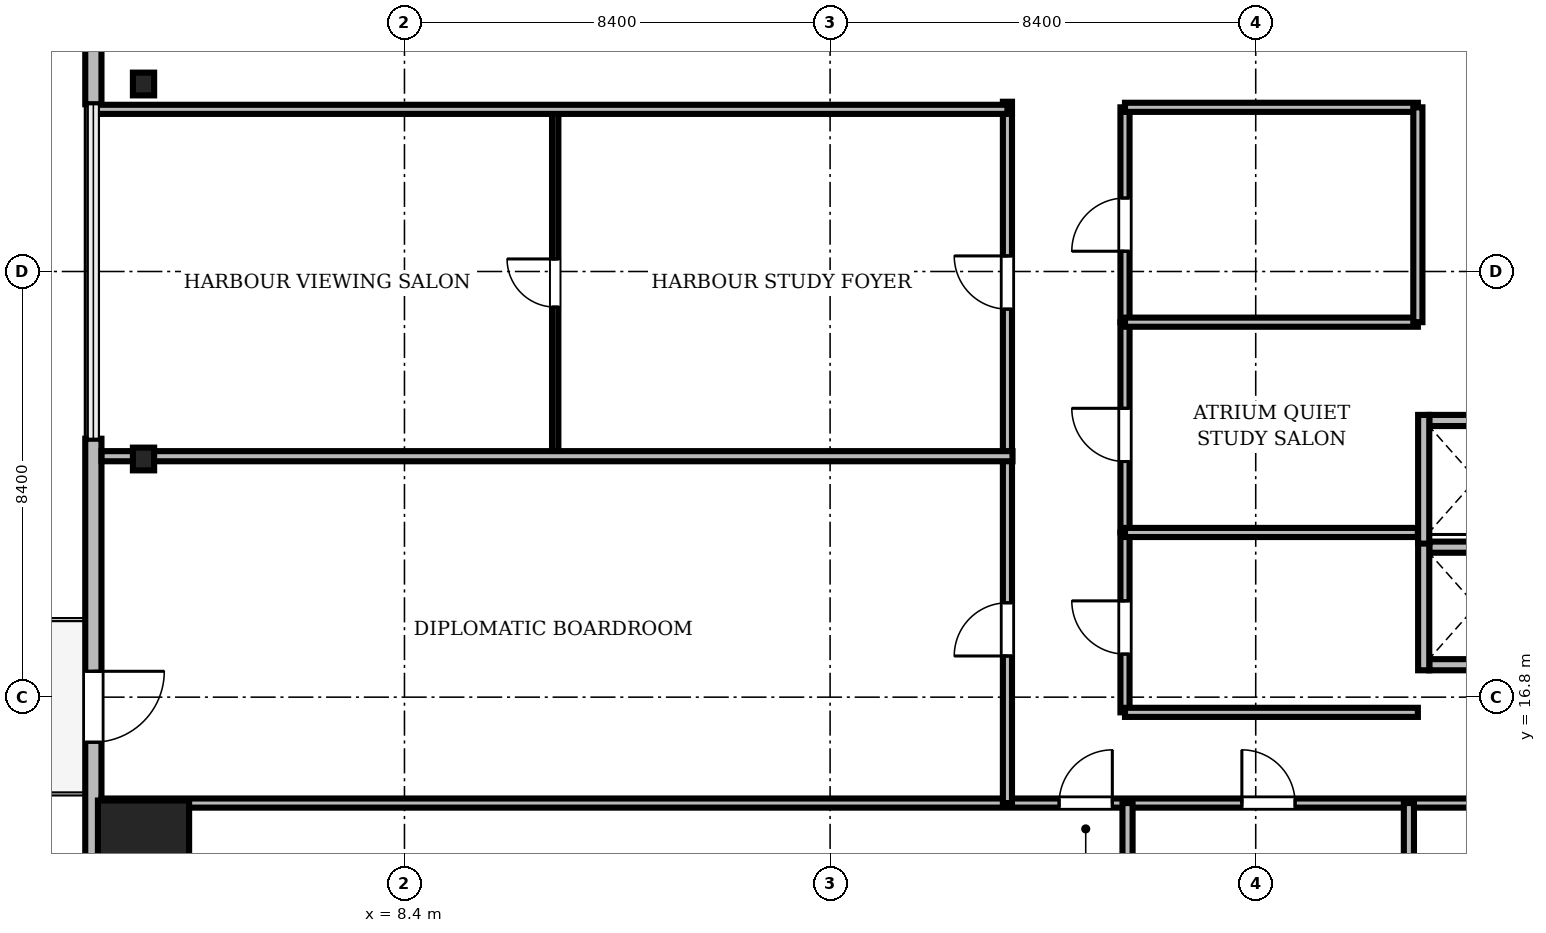
"""IFC4 building model, lengths in metres.
Left out: names, types, materials, properties, quantities, classifications, styles, units other than length and angle.
Written with IfcOpenShell. Run it as: python <this file> out.ifc"""

import sys

from ifc_helpers import new_model, si_unit, direction, frame, frame_2d, origin, origin_2d, place, context, subcontext, project, spatial, rectangle, i_section, extrude, source, transform, mapped, element, fill, save


model = new_model("IFC4")
c1 = context("Model", 3, precision=1e-05, world=origin(), true_north=direction((0.0, 1.0)))
c2 = subcontext(c1, "Body", "Model", "MODEL_VIEW")
j1 = project(units=[si_unit("LENGTHUNIT", "METRE"), si_unit("PLANEANGLEUNIT", "RADIAN")], contexts=[c1])
p1 = place(None, origin())
s1 = spatial("IfcSite", under=j1, at=p1, CompositionType="ELEMENT")
p2 = place(p1, origin())
s2 = spatial("IfcBuilding", under=s1, at=p2, CompositionType="ELEMENT")
p3 = place(p2, frame((0.0, 0.0, 67.75)))
s3 = spatial("IfcBuildingStorey", under=s2, at=p3, CompositionType="ELEMENT", Elevation=67.75)
m1 = source(origin(), c2, "Body", "SweptSolid", [
    extrude(rectangle(XDim=1.8, YDim=1.8, at=origin_2d()), origin(), (0.0, 0.0, 1.0), 3.41),
])
p4 = place(p3, frame((3.25, 13.86, 0.0), z_axis=(0.0, 0.0, 1.0), x_axis=(1.0, 0.0, 0.0)))
e1 = element("IfcColumn", 1, at=p4, inside=s3, PredefinedType="COLUMN", context=c2, shape_type="MappedRepresentation", body=[
    mapped(m1, transform((0.0, 0.0, 0.0), scale=1.0)),
])
m2 = source(origin(), c2, "Body", "SweptSolid", [
    extrude(i_section(OverallWidth=0.419, OverallDepth=0.449, WebThickness=0.031, FlangeThickness=0.048, FilletRadius=0.015, at=origin_2d()), origin(), (0.0, 0.0, 1.0), 3.41),
])
for number, where, z_axis, x_axis in (
    (2, (3.25, 28.9, 0.0), (0.0, 0.0, 1.0), (1.0, 0.0, 0.0)),
    (3, (3.25, 21.5, 0.0), (0.0, 0.0, 1.0), (1.0, 0.0, 0.0)),
):
    element("IfcColumn", number, at=place(p3, frame(where, z_axis=z_axis, x_axis=x_axis)), inside=s3, PredefinedType="COLUMN", context=c2, shape_type="MappedRepresentation", body=[
        mapped(m2, transform((0.0, 0.0, 0.0), scale=1.0)),
    ])
m3 = source(origin(), c2, "Body", "SweptSolid", [
    extrude(rectangle(XDim=15.6, YDim=0.32, at=frame_2d((7.8, 0.0))), origin(), (0.0, 0.0, 1.0), 3.41),
])
p5 = place(p3, frame((2.26, 44.1, 0.0), z_axis=(0.0, 0.0, 1.0), x_axis=(0.0, -1.0, 0.0)))
e4 = element("IfcWall", 4, at=p5, inside=s3, PredefinedType="SOLIDWALL", context=c2, shape_type="MappedRepresentation", body=[
    mapped(m3, transform((0.0, 0.0, 0.0), scale=1.0)),
])
m4 = source(origin(), c2, "Body", "SweptSolid", [
    extrude(rectangle(XDim=2.2, YDim=2.4, at=frame_2d((1.1, 1.2))), frame((0.0, 0.17, 0.0), z_axis=(0.0, -1.0, 0.0), x_axis=(1.0, 0.0, 0.0)), (0.0, 0.0, 1.0), 0.34),
])
p6 = place(p5, frame((3.005, 0.0, 0.72)))
e5 = element("IfcOpeningElement", 5, at=p6, cuts=e4, PredefinedType="OPENING", context=c2, shape_type="MappedRepresentation", body=[
    mapped(m4, transform((0.0, 0.0, 0.0), scale=1.0)),
])
m5 = source(origin(), c2, "Body", "SweptSolid", [
    extrude(rectangle(XDim=15.6, YDim=0.32, at=frame_2d((7.8, 0.0))), origin(), (0.0, 0.0, 1.0), 3.41),
])
p7 = place(p3, frame((2.26, 21.9, 0.0), z_axis=(0.0, 0.0, 1.0), x_axis=(0.0, -1.0, 0.0)))
e6 = element("IfcWall", 6, at=p7, inside=s3, PredefinedType="SOLIDWALL", context=c2, shape_type="MappedRepresentation", body=[
    mapped(m5, transform((0.0, 0.0, 0.0), scale=1.0)),
])
m6 = source(origin(), c2, "Body", "SweptSolid", [
    extrude(rectangle(XDim=1.4, YDim=2.3, at=frame_2d((0.7, 1.15))), frame((0.0, 0.17, 0.0), z_axis=(0.0, -1.0, 0.0), x_axis=(1.0, 0.0, 0.0)), (0.0, 0.0, 1.0), 0.34),
])
p8 = place(p7, frame((4.59, 0.0, 0.0)))
e7 = element("IfcOpeningElement", 7, at=p8, cuts=e6, PredefinedType="OPENING", context=c2, shape_type="MappedRepresentation", body=[
    mapped(m6, transform((0.0, 0.0, 0.0), scale=1.0)),
])
p9 = place(p7, frame((10.395, 0.0, 0.72)))
e8 = element("IfcOpeningElement", 8, at=p9, cuts=e6, PredefinedType="OPENING", context=c2, shape_type="MappedRepresentation", body=[
    mapped(m4, transform((0.0, 0.0, 0.0), scale=1.0)),
])
m7 = source(origin(), c2, "Body", "SweptSolid", [
    extrude(rectangle(XDim=1.85, YDim=0.22, at=frame_2d((0.925, 0.0))), origin(), (0.0, 0.0, 1.0), 3.41),
])
for number, where, z_axis, x_axis in (
    (9, (28.625, 17.44, 0.0), (0.0, 0.0, 1.0), (1.0, 0.0, 0.0)),
    (10, (28.625, 19.76, 0.0), (0.0, 0.0, 1.0), (1.0, 0.0, 0.0)),
):
    element("IfcWall", number, at=place(p3, frame(where, z_axis=z_axis, x_axis=x_axis)), inside=s3, PredefinedType="SOLIDWALL", context=c2, shape_type="MappedRepresentation", body=[
        mapped(m7, transform((0.0, 0.0, 0.0), scale=1.0)),
    ])
m8 = source(origin(), c2, "Body", "SweptSolid", [
    extrude(rectangle(XDim=2.54, YDim=0.22, at=frame_2d((1.27, 0.0))), origin(), (0.0, 0.0, 1.0), 3.41),
])
p10 = place(p3, frame((28.515, 17.33, 0.0), z_axis=(0.0, 0.0, 1.0), x_axis=(0.0, 1.0, 0.0)))
e11 = element("IfcWall", 11, at=p10, inside=s3, PredefinedType="SOLIDWALL", context=c2, shape_type="MappedRepresentation", body=[
    mapped(m8, transform((0.0, 0.0, 0.0), scale=1.0)),
])
p11 = place(p3, frame((28.625, 22.26, 0.0), z_axis=(0.0, 0.0, 1.0), x_axis=(1.0, 0.0, 0.0)))
e12 = element("IfcWall", 12, at=p11, inside=s3, PredefinedType="SOLIDWALL", context=c2, shape_type="MappedRepresentation", body=[
    mapped(m7, transform((0.0, 0.0, 0.0), scale=1.0)),
])
p12 = place(p3, frame((28.515, 19.83, 0.0), z_axis=(0.0, 0.0, 1.0), x_axis=(0.0, 1.0, 0.0)))
e13 = element("IfcWall", 13, at=p12, inside=s3, PredefinedType="SOLIDWALL", context=c2, shape_type="MappedRepresentation", body=[
    mapped(m8, transform((0.0, 0.0, 0.0), scale=1.0)),
])
m9 = source(origin(), c2, "Body", "SweptSolid", [
    extrude(rectangle(XDim=46.156, YDim=0.18, at=frame_2d((23.078, 0.0))), origin(), (0.0, 0.0, 1.0), 2.652),
])
p13 = place(p3, frame((2.422, 14.71, 0.0), z_axis=(0.0, 0.0, 1.0), x_axis=(1.0, 0.0, 0.0)))
e14 = element("IfcWall", 14, at=p13, inside=s3, PredefinedType="PARTITIONING", context=c2, shape_type="MappedRepresentation", body=[
    mapped(m9, transform((0.0, 0.0, 0.0), scale=1.0)),
])
m10 = source(origin(), c2, "Body", "SweptSolid", [
    extrude(rectangle(XDim=1.05, YDim=2.2, at=frame_2d((0.525, 1.1))), frame((0.0, 0.1, 0.0), z_axis=(0.0, -1.0, 0.0), x_axis=(1.0, 0.0, 0.0)), (0.0, 0.0, 1.0), 0.2),
])
p14 = place(p13, frame((18.898, 0.0, 0.0)))
e15 = element("IfcOpeningElement", 15, at=p14, cuts=e14, PredefinedType="OPENING", context=c2, shape_type="MappedRepresentation", body=[
    mapped(m10, transform((0.0, 0.0, 0.0), scale=1.0)),
])
p15 = place(p13, frame((22.505, 0.0, 0.0)))
e16 = element("IfcOpeningElement", 16, at=p15, cuts=e14, PredefinedType="OPENING", context=c2, shape_type="MappedRepresentation", body=[
    mapped(m10, transform((0.0, 0.0, 0.0), scale=1.0)),
])
p16 = place(p13, frame((28.814, 0.0, 0.0)))
e17 = element("IfcOpeningElement", 17, at=p16, cuts=e14, PredefinedType="OPENING", context=c2, shape_type="MappedRepresentation", body=[
    mapped(m10, transform((0.0, 0.0, 0.0), scale=1.0)),
])
p17 = place(p13, frame((34.368, 0.0, 0.0)))
e18 = element("IfcOpeningElement", 18, at=p17, cuts=e14, PredefinedType="OPENING", context=c2, shape_type="MappedRepresentation", body=[
    mapped(m10, transform((0.0, 0.0, 0.0), scale=1.0)),
])
p18 = place(p13, frame((40.998, 0.0, 0.0)))
e19 = element("IfcOpeningElement", 19, at=p18, cuts=e14, PredefinedType="OPENING", context=c2, shape_type="MappedRepresentation", body=[
    mapped(m10, transform((0.0, 0.0, 0.0), scale=1.0)),
])
m11 = source(origin(), c2, "Body", "SweptSolid", [
    extrude(rectangle(XDim=13.84, YDim=0.18, at=frame_2d((6.92, 0.0))), origin(), (0.0, 0.0, 1.0), 2.802),
])
p19 = place(p3, frame((20.3, 14.71, 0.0), z_axis=(0.0, 0.0, 1.0), x_axis=(0.0, 1.0, 0.0)))
e20 = element("IfcWall", 20, at=p19, inside=s3, PredefinedType="PARTITIONING", context=c2, shape_type="MappedRepresentation", body=[
    mapped(m11, transform((0.0, 0.0, 0.0), scale=1.0)),
])
p20 = place(p19, frame((2.903, 0.0, 0.0)))
e21 = element("IfcOpeningElement", 21, at=p20, cuts=e20, PredefinedType="OPENING", context=c2, shape_type="MappedRepresentation", body=[
    mapped(m10, transform((0.0, 0.0, 0.0), scale=1.0)),
])
p21 = place(p19, frame((9.748, 0.0, 0.0)))
e22 = element("IfcOpeningElement", 22, at=p21, cuts=e20, PredefinedType="OPENING", context=c2, shape_type="MappedRepresentation", body=[
    mapped(m10, transform((0.0, 0.0, 0.0), scale=1.0)),
])
m12 = source(origin(), c2, "Body", "SweptSolid", [
    extrude(rectangle(XDim=6.845, YDim=0.125, at=frame_2d((3.422, 0.0))), origin(), (0.0, 0.0, 1.0), 2.802),
])
p22 = place(p3, frame((11.375, 21.555, 0.0), z_axis=(0.0, 0.0, 1.0), x_axis=(0.0, 1.0, 0.0)))
e23 = element("IfcWall", 23, at=p22, inside=s3, PredefinedType="PARTITIONING", context=c2, shape_type="MappedRepresentation", body=[
    mapped(m12, transform((0.0, 0.0, 0.0), scale=1.0)),
])
m13 = source(origin(), c2, "Body", "SweptSolid", [
    extrude(rectangle(XDim=0.95, YDim=2.15, at=frame_2d((0.475, 1.075))), frame((0.0, 0.073, 0.0), z_axis=(0.0, -1.0, 0.0), x_axis=(1.0, 0.0, 0.0)), (0.0, 0.0, 1.0), 0.145),
])
p23 = place(p22, frame((2.942, 0.0, 0.0)))
e24 = element("IfcOpeningElement", 24, at=p23, cuts=e23, PredefinedType="OPENING", context=c2, shape_type="MappedRepresentation", body=[
    mapped(m13, transform((0.0, 0.0, 0.0), scale=1.0)),
])
m14 = source(origin(), c2, "Body", "SweptSolid", [
    extrude(rectangle(XDim=4.24, YDim=0.18, at=frame_2d((2.12, 0.0))), origin(), (0.0, 0.0, 1.0), 2.802),
])
p24 = place(p3, frame((22.62, 24.2, 0.0), z_axis=(0.0, 0.0, 1.0), x_axis=(0.0, 1.0, 0.0)))
e25 = element("IfcWall", 25, at=p24, inside=s3, PredefinedType="PARTITIONING", context=c2, shape_type="MappedRepresentation", body=[
    mapped(m14, transform((0.0, 0.0, 0.0), scale=1.0)),
])
p25 = place(p24, frame((1.4, 0.0, 0.0)))
e26 = element("IfcOpeningElement", 26, at=p25, cuts=e25, PredefinedType="OPENING", context=c2, shape_type="MappedRepresentation", body=[
    mapped(m10, transform((0.0, 0.0, 0.0), scale=1.0)),
])
m15 = source(origin(), c2, "Body", "SweptSolid", [
    extrude(rectangle(XDim=4.15, YDim=0.18, at=frame_2d((2.075, 0.0))), origin(), (0.0, 0.0, 1.0), 3.042),
])
p26 = place(p3, frame((22.62, 20.05, 0.0), z_axis=(0.0, 0.0, 1.0), x_axis=(0.0, 1.0, 0.0)))
e27 = element("IfcWall", 27, at=p26, inside=s3, PredefinedType="PARTITIONING", context=c2, shape_type="MappedRepresentation", body=[
    mapped(m15, transform((0.0, 0.0, 0.0), scale=1.0)),
])
p27 = place(p26, frame((1.4, 0.0, 0.0)))
e28 = element("IfcOpeningElement", 28, at=p27, cuts=e27, PredefinedType="OPENING", context=c2, shape_type="MappedRepresentation", body=[
    mapped(m10, transform((0.0, 0.0, 0.0), scale=1.0)),
])
m16 = source(origin(), c2, "Body", "SweptSolid", [
    extrude(rectangle(XDim=3.55, YDim=0.18, at=frame_2d((1.775, 0.0))), origin(), (0.0, 0.0, 1.0), 2.802),
])
p28 = place(p3, frame((22.62, 16.5, 0.0), z_axis=(0.0, 0.0, 1.0), x_axis=(0.0, 1.0, 0.0)))
e29 = element("IfcWall", 29, at=p28, inside=s3, PredefinedType="PARTITIONING", context=c2, shape_type="MappedRepresentation", body=[
    mapped(m16, transform((0.0, 0.0, 0.0), scale=1.0)),
])
p29 = place(p28, frame((1.15, 0.0, 0.0)))
e30 = element("IfcOpeningElement", 30, at=p29, cuts=e29, PredefinedType="OPENING", context=c2, shape_type="MappedRepresentation", body=[
    mapped(m10, transform((0.0, 0.0, 0.0), scale=1.0)),
])
m17 = source(origin(), c2, "Body", "SweptSolid", [
    extrude(rectangle(XDim=17.978, YDim=0.2, at=frame_2d((8.989, 0.0))), origin(), (0.0, 0.0, 1.0), 2.652),
])
p30 = place(p3, frame((2.422, 21.555, 0.0), z_axis=(0.0, 0.0, 1.0), x_axis=(1.0, 0.0, 0.0)))
e31 = element("IfcWall", 31, at=p30, inside=s3, PredefinedType="PARTITIONING", context=c2, shape_type="MappedRepresentation", body=[
    mapped(m17, transform((0.0, 0.0, 0.0), scale=1.0)),
])
m18 = source(origin(), c2, "Body", "SweptSolid", [
    extrude(rectangle(XDim=18.07, YDim=0.18, at=frame_2d((9.035, 0.0))), origin(), (0.0, 0.0, 1.0), 2.652),
])
p31 = place(p3, frame((2.23, 28.4, 0.0), z_axis=(0.0, 0.0, 1.0), x_axis=(1.0, 0.0, 0.0)))
e32 = element("IfcWall", 32, at=p31, inside=s3, PredefinedType="PARTITIONING", context=c2, shape_type="MappedRepresentation", body=[
    mapped(m18, transform((0.0, 0.0, 0.0), scale=1.0)),
])
m19 = source(origin(), c2, "Body", "SweptSolid", [
    extrude(rectangle(XDim=12.78, YDim=0.2, at=frame_2d((6.39, 0.0))), origin(), (0.0, 0.0, 1.0), 2.652),
])
for number, where, z_axis, x_axis in (
    (33, (22.67, 1.93, 0.0), (0.0, 0.0, 1.0), (0.0, 1.0, 0.0)),
    (34, (28.223, 1.93, 0.0), (0.0, 0.0, 1.0), (0.0, 1.0, 0.0)),
):
    element("IfcWall", number, at=place(p3, frame(where, z_axis=z_axis, x_axis=x_axis)), inside=s3, PredefinedType="PARTITIONING", context=c2, shape_type="MappedRepresentation", body=[
        mapped(m19, transform((0.0, 0.0, 0.0), scale=1.0)),
    ])
m20 = source(origin(), c2, "Body", "SweptSolid", [
    extrude(rectangle(XDim=5.78, YDim=0.18, at=frame_2d((2.89, 0.0))), origin(), (0.0, 0.0, 1.0), 2.802),
])
p32 = place(p3, frame((22.62, 16.5, 0.0), z_axis=(0.0, 0.0, 1.0), x_axis=(1.0, 0.0, 0.0)))
e35 = element("IfcWall", 35, at=p32, inside=s3, PredefinedType="PARTITIONING", context=c2, shape_type="MappedRepresentation", body=[
    mapped(m20, transform((0.0, 0.0, 0.0), scale=1.0)),
])
m21 = source(origin(), c2, "Body", "SweptSolid", [
    extrude(rectangle(XDim=5.78, YDim=0.18, at=frame_2d((2.89, 0.0))), origin(), (0.0, 0.0, 1.0), 3.41),
])
for number, where, z_axis, x_axis in (
    (36, (22.62, 20.05, 0.0), (0.0, 0.0, 1.0), (1.0, 0.0, 0.0)),
    (37, (22.62, 24.2, 0.0), (0.0, 0.0, 1.0), (1.0, 0.0, 0.0)),
    (38, (22.62, 28.44, 0.0), (0.0, 0.0, 1.0), (1.0, 0.0, 0.0)),
):
    element("IfcWall", number, at=place(p3, frame(where, z_axis=z_axis, x_axis=x_axis)), inside=s3, PredefinedType="PARTITIONING", context=c2, shape_type="MappedRepresentation", body=[
        mapped(m21, transform((0.0, 0.0, 0.0), scale=1.0)),
    ])
p33 = place(p3, frame((28.4, 24.2, 0.0), z_axis=(0.0, 0.0, 1.0), x_axis=(0.0, 1.0, 0.0)))
e39 = element("IfcWall", 39, at=p33, inside=s3, PredefinedType="PARTITIONING", context=c2, shape_type="MappedRepresentation", body=[
    mapped(m14, transform((0.0, 0.0, 0.0), scale=1.0)),
])
m22 = source(origin(), c2, "Body", "SweptSolid", [
    extrude(rectangle(XDim=1.4, YDim=2.3, at=frame_2d((0.7, 1.15))), frame((0.0, 0.025, 0.0), z_axis=(0.0, -1.0, 0.0), x_axis=(1.0, 0.0, 0.0)), (0.0, 0.0, 1.0), 0.05),
])
p34 = place(p8, frame((1.4, 0.0, 0.0), z_axis=(0.0, 0.0, 1.0), x_axis=(-1.0, 0.0, 0.0)))
e40 = element("IfcDoor", 40, at=p34, inside=s3, OperationType="DOUBLE_DOOR_SLIDING", PredefinedType="DOOR", context=c2, shape_type="MappedRepresentation", body=[
    mapped(m22, transform((0.0, 0.0, 0.0), scale=1.0)),
])
fill(e7, e40)
m23 = source(origin(), c2, "Body", "SweptSolid", [
    extrude(rectangle(XDim=1.05, YDim=2.2, at=frame_2d((0.525, 1.1))), frame((0.0, 0.025, 0.0), z_axis=(0.0, -1.0, 0.0), x_axis=(1.0, 0.0, 0.0)), (0.0, 0.0, 1.0), 0.05),
])
p35 = place(p14, origin())
e41 = element("IfcDoor", 41, at=p35, inside=s3, OperationType="SINGLE_SWING_RIGHT", PredefinedType="DOOR", context=c2, shape_type="MappedRepresentation", body=[
    mapped(m23, transform((0.0, 0.0, 0.0), scale=1.0)),
])
fill(e15, e41)
p36 = place(p15, origin())
e42 = element("IfcDoor", 42, at=p36, inside=s3, OperationType="SINGLE_SWING_LEFT", PredefinedType="DOOR", context=c2, shape_type="MappedRepresentation", body=[
    mapped(m23, transform((0.0, 0.0, 0.0), scale=1.0)),
])
fill(e16, e42)
p37 = place(p20, origin())
e43 = element("IfcDoor", 43, at=p37, inside=s3, OperationType="SINGLE_SWING_LEFT", PredefinedType="DOOR", context=c2, shape_type="MappedRepresentation", body=[
    mapped(m23, transform((0.0, 0.0, 0.0), scale=1.0)),
])
fill(e21, e43)
p38 = place(p21, origin())
e44 = element("IfcDoor", 44, at=p38, inside=s3, OperationType="SINGLE_SWING_RIGHT", PredefinedType="DOOR", context=c2, shape_type="MappedRepresentation", body=[
    mapped(m23, transform((0.0, 0.0, 0.0), scale=1.0)),
])
fill(e22, e44)
m24 = source(origin(), c2, "Body", "SweptSolid", [
    extrude(rectangle(XDim=0.95, YDim=2.15, at=frame_2d((0.475, 1.075))), frame((0.0, 0.025, 0.0), z_axis=(0.0, -1.0, 0.0), x_axis=(1.0, 0.0, 0.0)), (0.0, 0.0, 1.0), 0.05),
])
p39 = place(p23, origin())
e45 = element("IfcDoor", 45, at=p39, inside=s3, OperationType="SINGLE_SWING_RIGHT", PredefinedType="DOOR", context=c2, shape_type="MappedRepresentation", body=[
    mapped(m24, transform((0.0, 0.0, 0.0), scale=1.0)),
])
fill(e24, e45)
p40 = place(p25, origin())
e46 = element("IfcDoor", 46, at=p40, inside=s3, OperationType="SINGLE_SWING_LEFT", PredefinedType="DOOR", context=c2, shape_type="MappedRepresentation", body=[
    mapped(m23, transform((0.0, 0.0, 0.0), scale=1.0)),
])
fill(e26, e46)
p41 = place(p27, origin())
e47 = element("IfcDoor", 47, at=p41, inside=s3, OperationType="SINGLE_SWING_RIGHT", PredefinedType="DOOR", context=c2, shape_type="MappedRepresentation", body=[
    mapped(m23, transform((0.0, 0.0, 0.0), scale=1.0)),
])
fill(e28, e47)
p42 = place(p29, origin())
e48 = element("IfcDoor", 48, at=p42, inside=s3, OperationType="SINGLE_SWING_RIGHT", PredefinedType="DOOR", context=c2, shape_type="MappedRepresentation", body=[
    mapped(m23, transform((0.0, 0.0, 0.0), scale=1.0)),
])
fill(e30, e48)
save(model, sys.argv[1])
